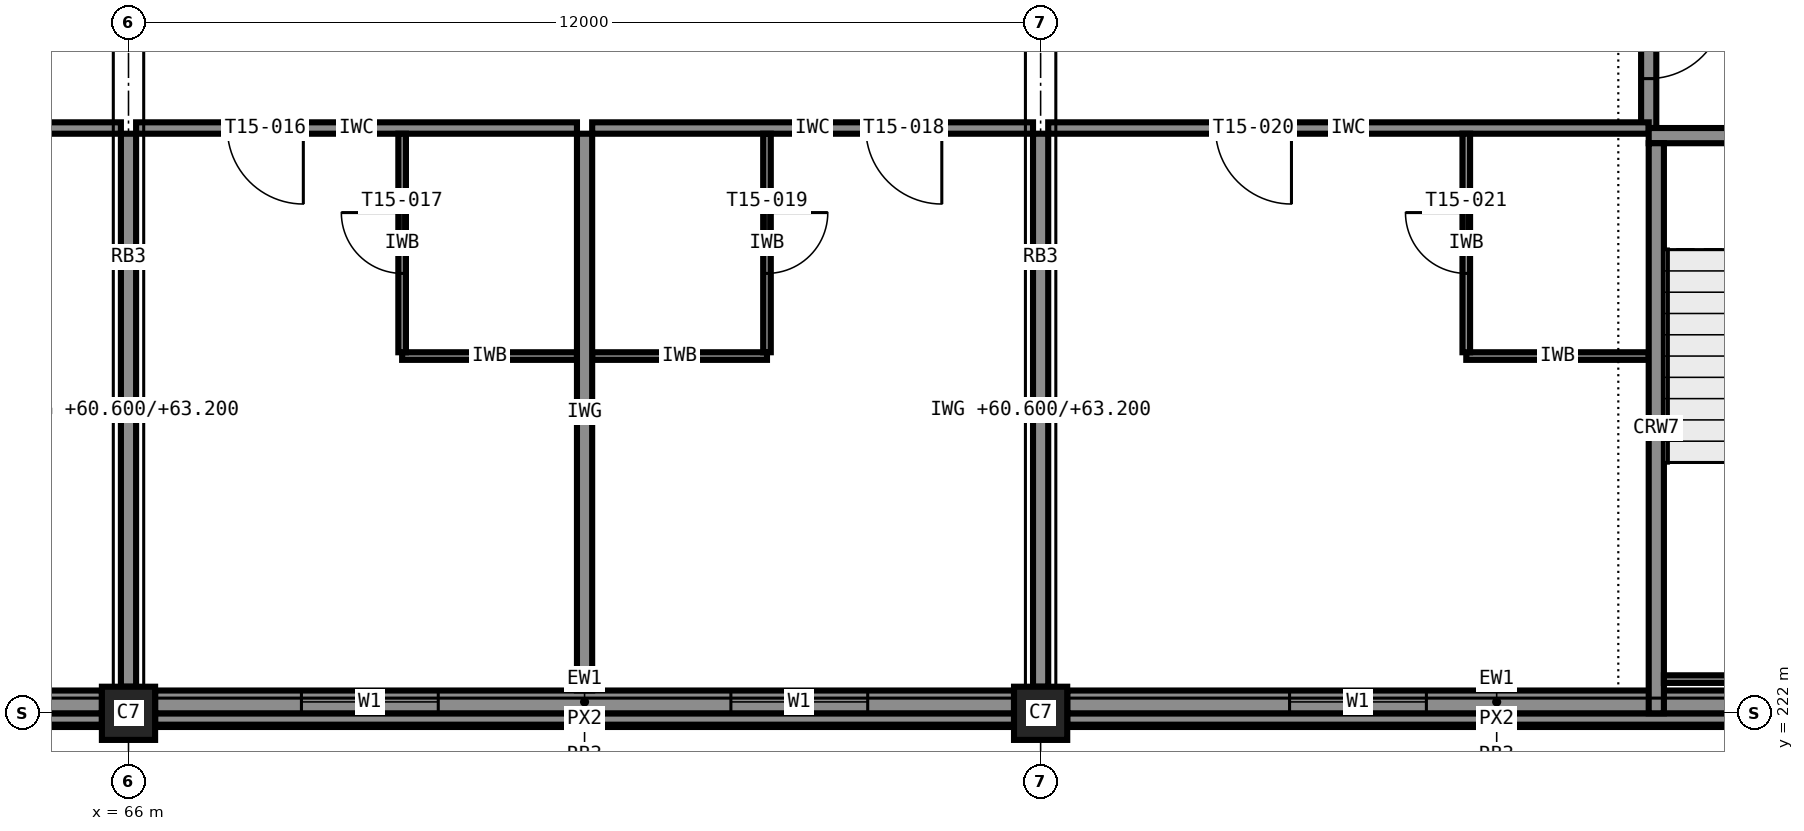
"""IFC4 building model, lengths in metres.
Left out: names, types, materials, properties, quantities, classifications, styles, units other than length and angle.
Written with IfcOpenShell. Run it as: python <this file> out.ifc"""

import sys

from ifc_helpers import new_model, si_unit, direction, frame, frame_2d, origin, origin_2d, place, context, subcontext, project, spatial, rectangle, extrude, element, fill, save


model = new_model("IFC4")
c1 = context("Model", 3, precision=1e-05, world=origin(), true_north=direction((0.0, 1.0)))
c2 = subcontext(c1, "Body", "Model", "MODEL_VIEW")
j1 = project(units=[si_unit("LENGTHUNIT", "METRE"), si_unit("PLANEANGLEUNIT", "RADIAN")], contexts=[c1])
p1 = place(None, origin())
s1 = spatial("IfcSite", under=j1, at=p1, CompositionType="ELEMENT")
p2 = place(p1, origin())
s2 = spatial("IfcBuilding", under=s1, at=p2, CompositionType="ELEMENT")
p3 = place(p2, frame((0.0, 0.0, 60.6)))
s3 = spatial("IfcBuildingStorey", under=s2, at=p3, CompositionType="ELEMENT", Elevation=60.6)
for number, where, z_axis, x_axis in (
    (1, (66.0, 222.0, 0.0), (0.0, 0.0, 1.0), (1.0, 0.0, 0.0)),
    (2, (78.0, 222.0, 0.0), (0.0, 0.0, 1.0), (1.0, 0.0, 0.0)),
):
    element("IfcColumn", number, at=place(p3, frame(where, z_axis=z_axis, x_axis=x_axis)), inside=s3, PredefinedType="COLUMN", context=c2, shape_type="SweptSolid", body=[
        extrude(rectangle(XDim=0.7, YDim=0.7, at=origin_2d()), origin(), (0.0, 0.0, 1.0), 3.6),
    ])
p4 = place(p3, frame((89.5, 229.6, 0.0), z_axis=(0.0, 0.0, 1.0), x_axis=(-1.0, 0.0, 0.0)))
e3 = element("IfcWall", 3, at=p4, inside=s3, PredefinedType="SHEAR", context=c2, shape_type="SweptSolid", body=[
    extrude(rectangle(XDim=3.5, YDim=0.2, at=frame_2d((1.75, 0.0))), origin(), (0.0, 0.0, 1.0), 3.6),
])
p5 = place(p4, frame((1.15, 0.0, 0.0)))
e4 = element("IfcOpeningElement", 4, at=p5, cuts=e3, PredefinedType="OPENING", context=c2, shape_type="SweptSolid", body=[
    extrude(rectangle(XDim=1.2, YDim=2.1, at=frame_2d((0.6, 1.05))), frame((0.0, 0.11, 0.0), z_axis=(0.0, -1.0, 0.0), x_axis=(1.0, 0.0, 0.0)), (0.0, 0.0, 1.0), 0.22),
])
p6 = place(p3, frame((86.1, 222.0, 0.0), z_axis=(0.0, 0.0, 1.0), x_axis=(0.0, 1.0, 0.0)))
e5 = element("IfcWall", 5, at=p6, inside=s3, PredefinedType="SHEAR", context=c2, shape_type="SweptSolid", body=[
    extrude(rectangle(XDim=7.5, YDim=0.2, at=frame_2d((3.75, 0.0))), origin(), (0.0, 0.0, 1.0), 3.6),
])
p7 = place(p3, frame((89.5, 222.45, 0.0), z_axis=(0.0, 0.0, 1.0), x_axis=(-1.0, 0.0, 0.0)))
e6 = element("IfcWall", 6, at=p7, inside=s3, PredefinedType="SHEAR", context=c2, shape_type="SweptSolid", body=[
    extrude(rectangle(XDim=3.3, YDim=0.1, at=frame_2d((1.65, 0.0))), origin(), (0.0, 0.0, 1.0), 3.4),
])
p8 = place(p3, frame((54.35, 222.15, 0.0), z_axis=(0.0, 0.0, 1.0), x_axis=(1.0, 0.0, 0.0)))
e7 = element("IfcWall", 7, at=p8, inside=s3, PredefinedType="STANDARD", context=c2, shape_type="SweptSolid", body=[
    extrude(rectangle(XDim=11.3, YDim=0.3, at=frame_2d((5.65, 0.0))), origin(), (0.0, 0.0, 1.0), 2.6),
])
p9 = place(p8, frame((1.925, 0.0, 0.85)))
e8 = element("IfcOpeningElement", 8, at=p9, cuts=e7, PredefinedType="OPENING", context=c2, shape_type="SweptSolid", body=[
    extrude(rectangle(XDim=1.8, YDim=1.75, at=frame_2d((0.9, 0.875))), frame((0.0, 0.16, 0.0), z_axis=(0.0, -1.0, 0.0), x_axis=(1.0, 0.0, 0.0)), (0.0, 0.0, 1.0), 0.32),
])
p10 = place(p8, frame((7.575, 0.0, 0.85)))
e9 = element("IfcOpeningElement", 9, at=p10, cuts=e7, PredefinedType="OPENING", context=c2, shape_type="SweptSolid", body=[
    extrude(rectangle(XDim=1.8, YDim=1.75, at=frame_2d((0.9, 0.875))), frame((0.0, 0.16, 0.0), z_axis=(0.0, -1.0, 0.0), x_axis=(1.0, 0.0, 0.0)), (0.0, 0.0, 1.0), 0.32),
])
p11 = place(p3, frame((66.35, 222.15, 0.0), z_axis=(0.0, 0.0, 1.0), x_axis=(1.0, 0.0, 0.0)))
e10 = element("IfcWall", 10, at=p11, inside=s3, PredefinedType="STANDARD", context=c2, shape_type="SweptSolid", body=[
    extrude(rectangle(XDim=11.3, YDim=0.3, at=frame_2d((5.65, 0.0))), origin(), (0.0, 0.0, 1.0), 2.6),
])
p12 = place(p11, frame((1.925, 0.0, 0.85)))
e11 = element("IfcOpeningElement", 11, at=p12, cuts=e10, PredefinedType="OPENING", context=c2, shape_type="SweptSolid", body=[
    extrude(rectangle(XDim=1.8, YDim=1.75, at=frame_2d((0.9, 0.875))), frame((0.0, 0.16, 0.0), z_axis=(0.0, -1.0, 0.0), x_axis=(1.0, 0.0, 0.0)), (0.0, 0.0, 1.0), 0.32),
])
p13 = place(p11, frame((7.575, 0.0, 0.85)))
e12 = element("IfcOpeningElement", 12, at=p13, cuts=e10, PredefinedType="OPENING", context=c2, shape_type="SweptSolid", body=[
    extrude(rectangle(XDim=1.8, YDim=1.75, at=frame_2d((0.9, 0.875))), frame((0.0, 0.16, 0.0), z_axis=(0.0, -1.0, 0.0), x_axis=(1.0, 0.0, 0.0)), (0.0, 0.0, 1.0), 0.32),
])
p14 = place(p3, frame((78.35, 222.15, 0.0), z_axis=(0.0, 0.0, 1.0), x_axis=(1.0, 0.0, 0.0)))
e13 = element("IfcWall", 13, at=p14, inside=s3, PredefinedType="STANDARD", context=c2, shape_type="SweptSolid", body=[
    extrude(rectangle(XDim=11.3, YDim=0.3, at=frame_2d((5.65, 0.0))), origin(), (0.0, 0.0, 1.0), 2.6),
])
p15 = place(p14, frame((2.925, 0.0, 0.85)))
e14 = element("IfcOpeningElement", 14, at=p15, cuts=e13, PredefinedType="OPENING", context=c2, shape_type="SweptSolid", body=[
    extrude(rectangle(XDim=1.8, YDim=1.75, at=frame_2d((0.9, 0.875))), frame((0.0, 0.16, 0.0), z_axis=(0.0, -1.0, 0.0), x_axis=(1.0, 0.0, 0.0)), (0.0, 0.0, 1.0), 0.32),
])
for number, where, z_axis, x_axis in (
    (15, (54.35, 221.925, 3.4), (0.0, 0.0, 1.0), (1.0, 0.0, 0.0)),
    (16, (66.35, 221.925, 3.4), (0.0, 0.0, 1.0), (1.0, 0.0, 0.0)),
    (17, (78.35, 221.925, 3.4), (0.0, 0.0, 1.0), (1.0, 0.0, 0.0)),
):
    element("IfcWall", number, at=place(p3, frame(where, z_axis=z_axis, x_axis=x_axis)), inside=s3, PredefinedType="STANDARD", context=c2, shape_type="SweptSolid", body=[
        extrude(rectangle(XDim=11.3, YDim=0.15, at=frame_2d((5.65, 0.0))), origin(), (0.0, 0.0, 1.0), 0.2),
    ])
p16 = place(p3, frame((86.0, 232.0, 0.0), z_axis=(0.0, 0.0, 1.0), x_axis=(0.0, -1.0, 0.0)))
e18 = element("IfcWall", 18, at=p16, inside=s3, PredefinedType="PARTITIONING", context=c2, shape_type="SweptSolid", body=[
    extrude(rectangle(XDim=2.3, YDim=0.2, at=frame_2d((1.15, 0.0))), origin(), (0.0, 0.0, 1.0), 3.4),
])
p17 = place(p16, frame((0.65, 0.0, 0.0)))
e19 = element("IfcOpeningElement", 19, at=p17, cuts=e18, PredefinedType="OPENING", context=c2, shape_type="SweptSolid", body=[
    extrude(rectangle(XDim=1.0, YDim=2.1, at=frame_2d((0.5, 1.05))), frame((0.0, 0.11, 0.0), z_axis=(0.0, -1.0, 0.0), x_axis=(1.0, 0.0, 0.0)), (0.0, 0.0, 1.0), 0.22),
])
p18 = place(p3, frame((65.9, 229.7, 0.0), z_axis=(0.0, 0.0, 1.0), x_axis=(-1.0, 0.0, 0.0)))
e20 = element("IfcWall", 20, at=p18, inside=s3, PredefinedType="PARTITIONING", context=c2, shape_type="SweptSolid", body=[
    extrude(rectangle(XDim=5.8, YDim=0.15, at=frame_2d((2.9, 0.0))), origin(), (0.0, 0.0, 1.0), 3.4),
])
p19 = place(p18, frame((1.2, 0.0, 0.0)))
e21 = element("IfcOpeningElement", 21, at=p19, cuts=e20, PredefinedType="OPENING", context=c2, shape_type="SweptSolid", body=[
    extrude(rectangle(XDim=1.0, YDim=2.1, at=frame_2d((0.5, 1.05))), frame((0.0, 0.085, 0.0), z_axis=(0.0, -1.0, 0.0), x_axis=(1.0, 0.0, 0.0)), (0.0, 0.0, 1.0), 0.17),
])
p20 = place(p3, frame((71.9, 229.7, 0.0), z_axis=(0.0, 0.0, 1.0), x_axis=(-1.0, 0.0, 0.0)))
e22 = element("IfcWall", 22, at=p20, inside=s3, PredefinedType="PARTITIONING", context=c2, shape_type="SweptSolid", body=[
    extrude(rectangle(XDim=5.8, YDim=0.15, at=frame_2d((2.9, 0.0))), origin(), (0.0, 0.0, 1.0), 3.4),
])
p21 = place(p20, frame((3.6, 0.0, 0.0)))
e23 = element("IfcOpeningElement", 23, at=p21, cuts=e22, PredefinedType="OPENING", context=c2, shape_type="SweptSolid", body=[
    extrude(rectangle(XDim=1.0, YDim=2.1, at=frame_2d((0.5, 1.05))), frame((0.0, 0.085, 0.0), z_axis=(0.0, -1.0, 0.0), x_axis=(1.0, 0.0, 0.0)), (0.0, 0.0, 1.0), 0.17),
])
p22 = place(p3, frame((69.6, 226.7, 0.0), z_axis=(0.0, 0.0, 1.0), x_axis=(1.0, 0.0, 0.0)))
e24 = element("IfcWall", 24, at=p22, inside=s3, PredefinedType="PARTITIONING", context=c2, shape_type="SweptSolid", body=[
    extrude(rectangle(XDim=2.3, YDim=0.1, at=frame_2d((1.15, 0.0))), origin(), (0.0, 0.0, 1.0), 3.4),
])
p23 = place(p3, frame((69.6, 226.75, 0.0), z_axis=(0.0, 0.0, 1.0), x_axis=(0.0, 1.0, 0.0)))
e25 = element("IfcWall", 25, at=p23, inside=s3, PredefinedType="PARTITIONING", context=c2, shape_type="SweptSolid", body=[
    extrude(rectangle(XDim=2.875, YDim=0.1, at=frame_2d((1.438, 0.0))), origin(), (0.0, 0.0, 1.0), 3.4),
])
p24 = place(p23, frame((1.038, 0.0, 0.0)))
e26 = element("IfcOpeningElement", 26, at=p24, cuts=e25, PredefinedType="OPENING", context=c2, shape_type="SweptSolid", body=[
    extrude(rectangle(XDim=0.8, YDim=2.1, at=frame_2d((0.4, 1.05))), frame((0.0, 0.06, 0.0), z_axis=(0.0, -1.0, 0.0), x_axis=(1.0, 0.0, 0.0)), (0.0, 0.0, 1.0), 0.12),
])
p25 = place(p3, frame((77.9, 229.7, 0.0), z_axis=(0.0, 0.0, 1.0), x_axis=(-1.0, 0.0, 0.0)))
e27 = element("IfcWall", 27, at=p25, inside=s3, PredefinedType="PARTITIONING", context=c2, shape_type="SweptSolid", body=[
    extrude(rectangle(XDim=5.8, YDim=0.15, at=frame_2d((2.9, 0.0))), origin(), (0.0, 0.0, 1.0), 3.4),
])
p26 = place(p25, frame((1.2, 0.0, 0.0)))
e28 = element("IfcOpeningElement", 28, at=p26, cuts=e27, PredefinedType="OPENING", context=c2, shape_type="SweptSolid", body=[
    extrude(rectangle(XDim=1.0, YDim=2.1, at=frame_2d((0.5, 1.05))), frame((0.0, 0.085, 0.0), z_axis=(0.0, -1.0, 0.0), x_axis=(1.0, 0.0, 0.0)), (0.0, 0.0, 1.0), 0.17),
])
p27 = place(p3, frame((72.1, 226.7, 0.0), z_axis=(0.0, 0.0, 1.0), x_axis=(1.0, 0.0, 0.0)))
e29 = element("IfcWall", 29, at=p27, inside=s3, PredefinedType="PARTITIONING", context=c2, shape_type="SweptSolid", body=[
    extrude(rectangle(XDim=2.3, YDim=0.1, at=frame_2d((1.15, 0.0))), origin(), (0.0, 0.0, 1.0), 3.4),
])
p28 = place(p3, frame((74.4, 229.625, 0.0), z_axis=(0.0, 0.0, 1.0), x_axis=(0.0, -1.0, 0.0)))
e30 = element("IfcWall", 30, at=p28, inside=s3, PredefinedType="PARTITIONING", context=c2, shape_type="SweptSolid", body=[
    extrude(rectangle(XDim=2.875, YDim=0.1, at=frame_2d((1.438, 0.0))), origin(), (0.0, 0.0, 1.0), 3.4),
])
p29 = place(p28, frame((1.038, 0.0, 0.0)))
e31 = element("IfcOpeningElement", 31, at=p29, cuts=e30, PredefinedType="OPENING", context=c2, shape_type="SweptSolid", body=[
    extrude(rectangle(XDim=0.8, YDim=2.1, at=frame_2d((0.4, 1.05))), frame((0.0, 0.06, 0.0), z_axis=(0.0, -1.0, 0.0), x_axis=(1.0, 0.0, 0.0)), (0.0, 0.0, 1.0), 0.12),
])
p30 = place(p3, frame((86.0, 229.7, 0.0), z_axis=(0.0, 0.0, 1.0), x_axis=(-1.0, 0.0, 0.0)))
e32 = element("IfcWall", 32, at=p30, inside=s3, PredefinedType="PARTITIONING", context=c2, shape_type="SweptSolid", body=[
    extrude(rectangle(XDim=7.9, YDim=0.15, at=frame_2d((3.95, 0.0))), origin(), (0.0, 0.0, 1.0), 3.4),
])
p31 = place(p30, frame((4.7, 0.0, 0.0)))
e33 = element("IfcOpeningElement", 33, at=p31, cuts=e32, PredefinedType="OPENING", context=c2, shape_type="SweptSolid", body=[
    extrude(rectangle(XDim=1.0, YDim=2.1, at=frame_2d((0.5, 1.05))), frame((0.0, 0.085, 0.0), z_axis=(0.0, -1.0, 0.0), x_axis=(1.0, 0.0, 0.0)), (0.0, 0.0, 1.0), 0.17),
])
p32 = place(p3, frame((83.6, 226.7, 0.0), z_axis=(0.0, 0.0, 1.0), x_axis=(1.0, 0.0, 0.0)))
e34 = element("IfcWall", 34, at=p32, inside=s3, PredefinedType="PARTITIONING", context=c2, shape_type="SweptSolid", body=[
    extrude(rectangle(XDim=2.4, YDim=0.1, at=frame_2d((1.2, 0.0))), origin(), (0.0, 0.0, 1.0), 3.4),
])
p33 = place(p3, frame((83.6, 226.75, 0.0), z_axis=(0.0, 0.0, 1.0), x_axis=(0.0, 1.0, 0.0)))
e35 = element("IfcWall", 35, at=p33, inside=s3, PredefinedType="PARTITIONING", context=c2, shape_type="SweptSolid", body=[
    extrude(rectangle(XDim=2.875, YDim=0.1, at=frame_2d((1.438, 0.0))), origin(), (0.0, 0.0, 1.0), 3.4),
])
p34 = place(p33, frame((1.038, 0.0, 0.0)))
e36 = element("IfcOpeningElement", 36, at=p34, cuts=e35, PredefinedType="OPENING", context=c2, shape_type="SweptSolid", body=[
    extrude(rectangle(XDim=0.8, YDim=2.1, at=frame_2d((0.4, 1.05))), frame((0.0, 0.06, 0.0), z_axis=(0.0, -1.0, 0.0), x_axis=(1.0, 0.0, 0.0)), (0.0, 0.0, 1.0), 0.12),
])
p35 = place(p3, frame((66.0, 222.35, 0.0), z_axis=(0.0, 0.0, 1.0), x_axis=(0.0, 1.0, 0.0)))
e37 = element("IfcWall", 37, at=p35, inside=s3, PredefinedType="PARTITIONING", context=c2, shape_type="SweptSolid", body=[
    extrude(rectangle(XDim=7.275, YDim=0.2, at=frame_2d((3.637, 0.0))), origin(), (0.0, 0.0, 1.0), 2.6),
])
p36 = place(p3, frame((72.0, 222.3, 0.0), z_axis=(0.0, 0.0, 1.0), x_axis=(0.0, 1.0, 0.0)))
e38 = element("IfcWall", 38, at=p36, inside=s3, PredefinedType="PARTITIONING", context=c2, shape_type="SweptSolid", body=[
    extrude(rectangle(XDim=7.325, YDim=0.2, at=frame_2d((3.663, 0.0))), origin(), (0.0, 0.0, 1.0), 3.4),
])
p37 = place(p3, frame((78.0, 222.35, 0.0), z_axis=(0.0, 0.0, 1.0), x_axis=(0.0, 1.0, 0.0)))
e39 = element("IfcWall", 39, at=p37, inside=s3, PredefinedType="PARTITIONING", context=c2, shape_type="SweptSolid", body=[
    extrude(rectangle(XDim=7.275, YDim=0.2, at=frame_2d((3.637, 0.0))), origin(), (0.0, 0.0, 1.0), 2.6),
])
p38 = place(p12, origin())
e40 = element("IfcWindow", 40, at=p38, inside=s3, PartitioningType="SINGLE_PANEL", PredefinedType="WINDOW", context=c2, shape_type="SweptSolid", body=[
    extrude(rectangle(XDim=1.8, YDim=1.75, at=frame_2d((0.9, 0.875))), frame((0.0, 0.03, 0.0), z_axis=(0.0, -1.0, 0.0), x_axis=(1.0, 0.0, 0.0)), (0.0, 0.0, 1.0), 0.06),
])
fill(e11, e40)
p39 = place(p13, origin())
e41 = element("IfcWindow", 41, at=p39, inside=s3, PartitioningType="SINGLE_PANEL", PredefinedType="WINDOW", context=c2, shape_type="SweptSolid", body=[
    extrude(rectangle(XDim=1.8, YDim=1.75, at=frame_2d((0.9, 0.875))), frame((0.0, 0.03, 0.0), z_axis=(0.0, -1.0, 0.0), x_axis=(1.0, 0.0, 0.0)), (0.0, 0.0, 1.0), 0.06),
])
fill(e12, e41)
p40 = place(p15, origin())
e42 = element("IfcWindow", 42, at=p40, inside=s3, PartitioningType="SINGLE_PANEL", PredefinedType="WINDOW", context=c2, shape_type="SweptSolid", body=[
    extrude(rectangle(XDim=1.8, YDim=1.75, at=frame_2d((0.9, 0.875))), frame((0.0, 0.03, 0.0), z_axis=(0.0, -1.0, 0.0), x_axis=(1.0, 0.0, 0.0)), (0.0, 0.0, 1.0), 0.06),
])
fill(e14, e42)
p41 = place(p17, origin())
e43 = element("IfcDoor", 43, at=p41, inside=s3, OperationType="SINGLE_SWING_LEFT", PredefinedType="DOOR", context=c2, shape_type="SweptSolid", body=[
    extrude(rectangle(XDim=1.0, YDim=2.1, at=frame_2d((0.5, 1.05))), frame((0.0, 0.025, 0.0), z_axis=(0.0, -1.0, 0.0), x_axis=(1.0, 0.0, 0.0)), (0.0, 0.0, 1.0), 0.05),
])
fill(e19, e43)
p42 = place(p21, origin())
e44 = element("IfcDoor", 44, at=p42, inside=s3, OperationType="SINGLE_SWING_LEFT", PredefinedType="DOOR", context=c2, shape_type="SweptSolid", body=[
    extrude(rectangle(XDim=1.0, YDim=2.1, at=frame_2d((0.5, 1.05))), frame((0.0, 0.025, 0.0), z_axis=(0.0, -1.0, 0.0), x_axis=(1.0, 0.0, 0.0)), (0.0, 0.0, 1.0), 0.05),
])
fill(e23, e44)
p43 = place(p24, origin())
e45 = element("IfcDoor", 45, at=p43, inside=s3, OperationType="SINGLE_SWING_RIGHT", PredefinedType="DOOR", context=c2, shape_type="SweptSolid", body=[
    extrude(rectangle(XDim=0.8, YDim=2.1, at=frame_2d((0.4, 1.05))), frame((0.0, 0.025, 0.0), z_axis=(0.0, -1.0, 0.0), x_axis=(1.0, 0.0, 0.0)), (0.0, 0.0, 1.0), 0.05),
])
fill(e26, e45)
p44 = place(p26, origin())
e46 = element("IfcDoor", 46, at=p44, inside=s3, OperationType="SINGLE_SWING_LEFT", PredefinedType="DOOR", context=c2, shape_type="SweptSolid", body=[
    extrude(rectangle(XDim=1.0, YDim=2.1, at=frame_2d((0.5, 1.05))), frame((0.0, 0.025, 0.0), z_axis=(0.0, -1.0, 0.0), x_axis=(1.0, 0.0, 0.0)), (0.0, 0.0, 1.0), 0.05),
])
fill(e28, e46)
p45 = place(p29, origin())
e47 = element("IfcDoor", 47, at=p45, inside=s3, OperationType="SINGLE_SWING_LEFT", PredefinedType="DOOR", context=c2, shape_type="SweptSolid", body=[
    extrude(rectangle(XDim=0.8, YDim=2.1, at=frame_2d((0.4, 1.05))), frame((0.0, 0.025, 0.0), z_axis=(0.0, -1.0, 0.0), x_axis=(1.0, 0.0, 0.0)), (0.0, 0.0, 1.0), 0.05),
])
fill(e31, e47)
p46 = place(p31, origin())
e48 = element("IfcDoor", 48, at=p46, inside=s3, OperationType="SINGLE_SWING_LEFT", PredefinedType="DOOR", context=c2, shape_type="SweptSolid", body=[
    extrude(rectangle(XDim=1.0, YDim=2.1, at=frame_2d((0.5, 1.05))), frame((0.0, 0.025, 0.0), z_axis=(0.0, -1.0, 0.0), x_axis=(1.0, 0.0, 0.0)), (0.0, 0.0, 1.0), 0.05),
])
fill(e33, e48)
p47 = place(p34, origin())
e49 = element("IfcDoor", 49, at=p47, inside=s3, OperationType="SINGLE_SWING_RIGHT", PredefinedType="DOOR", context=c2, shape_type="SweptSolid", body=[
    extrude(rectangle(XDim=0.8, YDim=2.1, at=frame_2d((0.4, 1.05))), frame((0.0, 0.025, 0.0), z_axis=(0.0, -1.0, 0.0), x_axis=(1.0, 0.0, 0.0)), (0.0, 0.0, 1.0), 0.05),
])
fill(e36, e49)
save(model, sys.argv[1])
